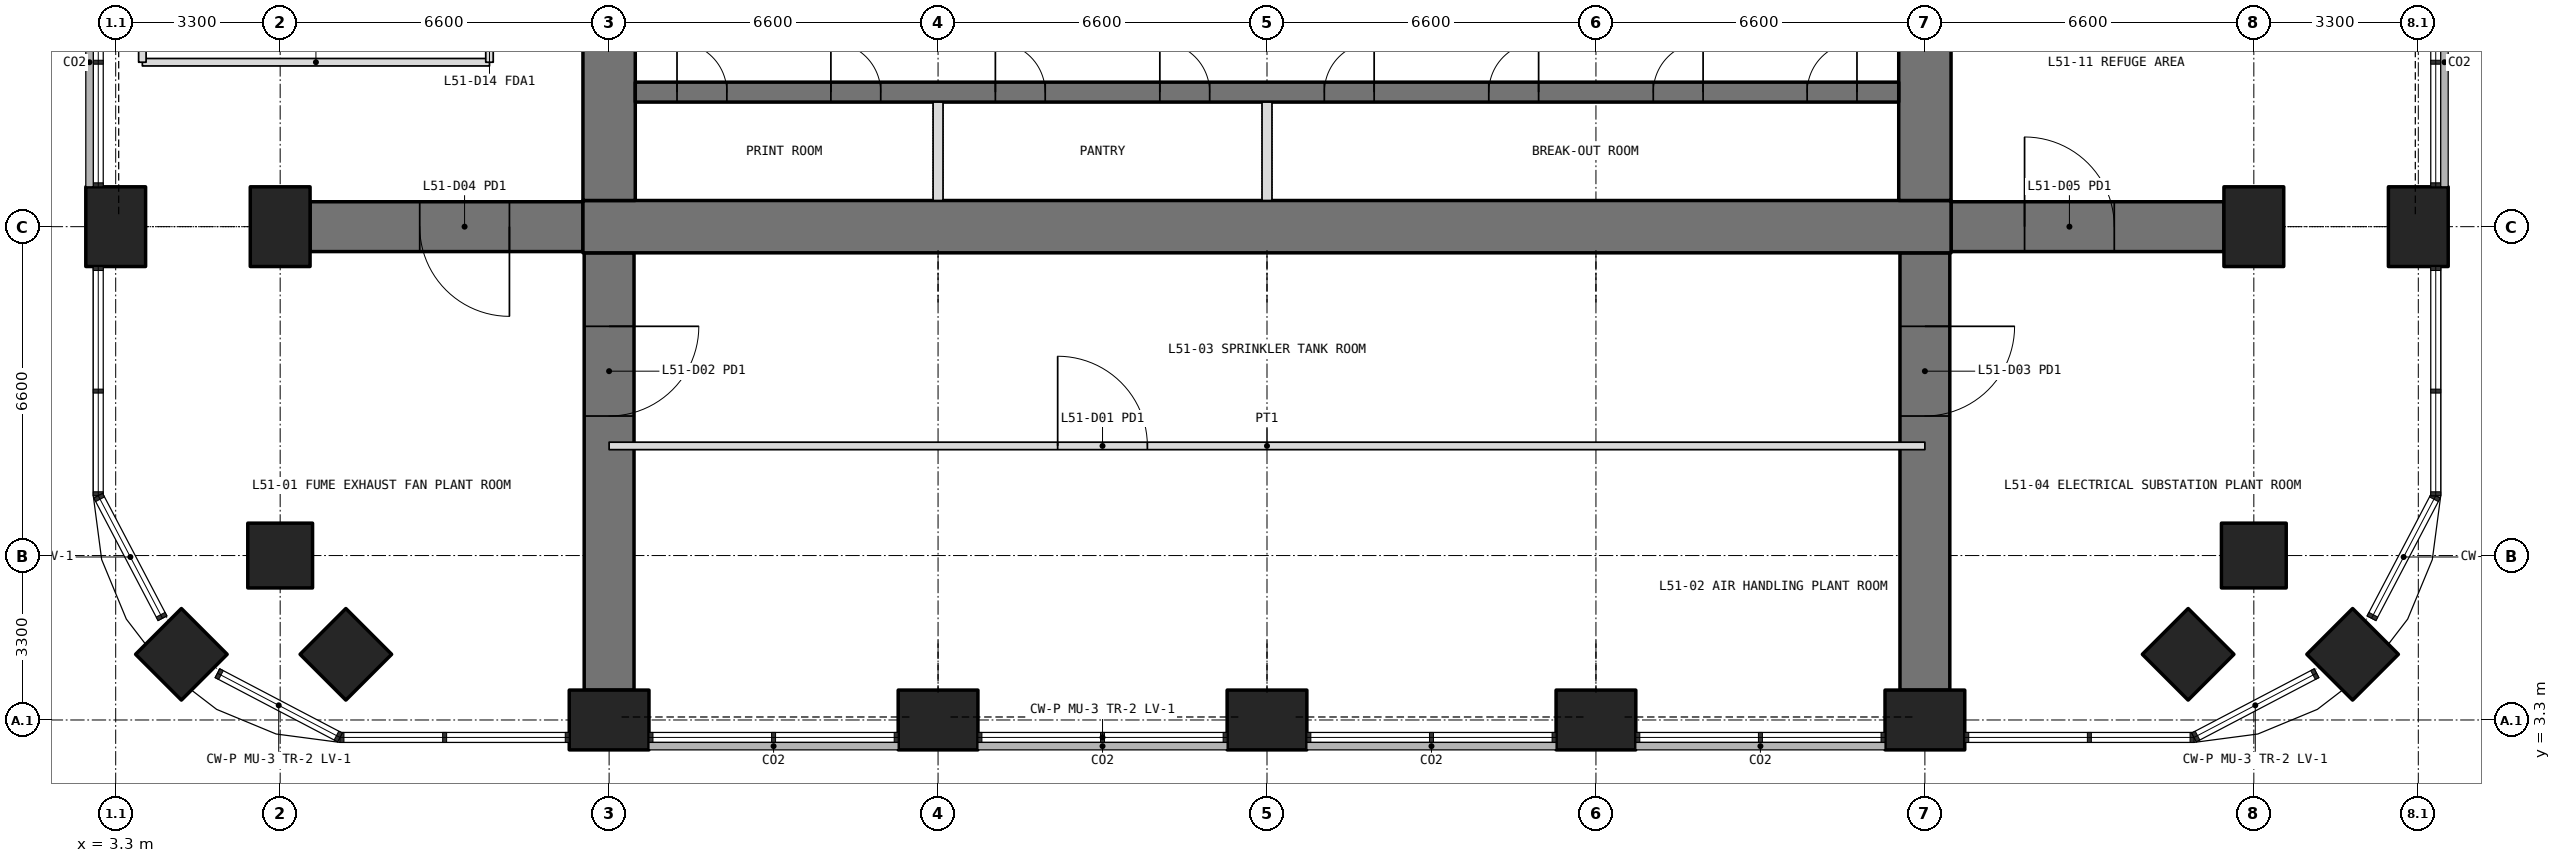
"""IFC4 building model, lengths in metres.
Left out: names, types, materials, properties, quantities, classifications, styles, units other than length and angle.
Written with IfcOpenShell. Run it as: python <this file> out.ifc"""

import sys

from ifc_helpers import new_model, si_unit, direction, frame, frame_2d, origin, origin_2d, place, context, subcontext, project, spatial, rectangle, extrude, element, fill, save


model = new_model("IFC4")
c1 = context("Model", 3, precision=1e-05, world=origin(), true_north=direction((0.0, 1.0)))
c2 = subcontext(c1, "Body", "Model", "MODEL_VIEW")
j1 = project(units=[si_unit("LENGTHUNIT", "METRE"), si_unit("PLANEANGLEUNIT", "RADIAN")], contexts=[c1])
p1 = place(None, origin())
s1 = spatial("IfcSite", under=j1, at=p1, CompositionType="ELEMENT")
p2 = place(p1, origin())
s2 = spatial("IfcBuilding", under=s1, at=p2, CompositionType="ELEMENT")
p3 = place(p2, frame((0.0, 0.0, 222.9)))
s3 = spatial("IfcBuildingStorey", under=s2, at=p3, CompositionType="ELEMENT", Elevation=222.9)
for number, where, z_axis, x_axis in (
    (1, (4.618, 4.618, 0.0), (0.0, 0.0, 1.0), (0.707, 0.707, 0.0)),
    (2, (48.182, 4.618, 0.0), (0.0, 0.0, 1.0), (0.707, 0.707, 0.0)),
):
    element("IfcColumn", number, at=place(p3, frame(where, z_axis=z_axis, x_axis=x_axis)), inside=s3, PredefinedType="COLUMN", context=c2, shape_type="SweptSolid", body=[
        extrude(rectangle(XDim=1.3, YDim=1.3, at=origin_2d()), origin(), (0.0, 0.0, 1.0), 6.3),
    ])
for number, where, z_axis, x_axis in (
    (3, (13.2, 3.3, 0.0), (0.0, 0.0, 1.0), (1.0, 0.0, 0.0)),
    (4, (19.8, 3.3, 0.0), (0.0, 0.0, 1.0), (1.0, 0.0, 0.0)),
    (5, (26.4, 3.3, 0.0), (0.0, 0.0, 1.0), (1.0, 0.0, 0.0)),
    (6, (33.0, 3.3, 0.0), (0.0, 0.0, 1.0), (1.0, 0.0, 0.0)),
    (7, (39.6, 3.3, 0.0), (0.0, 0.0, 1.0), (1.0, 0.0, 0.0)),
    (8, (3.3, 13.2, 0.0), (0.0, 0.0, 1.0), (0.0, 1.0, 0.0)),
    (9, (49.5, 13.2, 0.0), (0.0, 0.0, 1.0), (0.0, 1.0, 0.0)),
):
    element("IfcColumn", number, at=place(p3, frame(where, z_axis=z_axis, x_axis=x_axis)), inside=s3, PredefinedType="COLUMN", context=c2, shape_type="SweptSolid", body=[
        extrude(rectangle(XDim=1.6, YDim=1.2, at=origin_2d()), origin(), (0.0, 0.0, 1.0), 6.3),
    ])
for number, where, z_axis, x_axis in (
    (10, (6.6, 6.6, 0.0), (0.0, 0.0, 1.0), (1.0, 0.0, 0.0)),
    (11, (46.2, 6.6, 0.0), (0.0, 0.0, 1.0), (1.0, 0.0, 0.0)),
    (12, (7.918, 4.618, 0.0), (0.0, 0.0, 1.0), (0.707, 0.707, 0.0)),
    (13, (44.882, 4.618, 0.0), (0.0, 0.0, 1.0), (0.707, 0.707, 0.0)),
):
    element("IfcColumn", number, at=place(p3, frame(where, z_axis=z_axis, x_axis=x_axis)), inside=s3, PredefinedType="COLUMN", context=c2, shape_type="SweptSolid", body=[
        extrude(rectangle(XDim=1.3, YDim=1.3, at=origin_2d()), origin(), (0.0, 0.0, 1.0), 6.3),
    ])
for number, where, z_axis, x_axis in (
    (14, (6.6, 13.2, 0.0), (0.0, 0.0, 1.0), (0.0, 1.0, 0.0)),
    (15, (46.2, 13.2, 0.0), (0.0, 0.0, 1.0), (0.0, 1.0, 0.0)),
):
    element("IfcColumn", number, at=place(p3, frame(where, z_axis=z_axis, x_axis=x_axis)), inside=s3, PredefinedType="COLUMN", context=c2, shape_type="SweptSolid", body=[
        extrude(rectangle(XDim=1.6, YDim=1.2, at=origin_2d()), origin(), (0.0, 0.0, 1.0), 6.3),
    ])
p4 = place(p3, frame((13.2, 12.675, 0.0), z_axis=(0.0, 0.0, 1.0), x_axis=(0.0, -1.0, 0.0)))
e16 = element("IfcWall", 16, at=p4, inside=s3, PredefinedType="SHEAR", context=c2, shape_type="SweptSolid", body=[
    extrude(rectangle(XDim=8.775, YDim=1.0, at=frame_2d((4.388, 0.0))), origin(), (0.0, 0.0, 1.0), 6.0),
])
p5 = place(p4, frame((1.475, 0.0, 0.0)))
e17 = element("IfcOpeningElement", 17, at=p5, cuts=e16, PredefinedType="OPENING", context=c2, shape_type="SweptSolid", body=[
    extrude(rectangle(XDim=1.8, YDim=2.4, at=frame_2d((0.9, 1.2))), frame((0.0, 0.51, 0.0), z_axis=(0.0, -1.0, 0.0), x_axis=(1.0, 0.0, 0.0)), (0.0, 0.0, 1.0), 1.02),
])
p6 = place(p3, frame((39.6, 12.675, 0.0), z_axis=(0.0, 0.0, 1.0), x_axis=(0.0, -1.0, 0.0)))
e18 = element("IfcWall", 18, at=p6, inside=s3, PredefinedType="SHEAR", context=c2, shape_type="SweptSolid", body=[
    extrude(rectangle(XDim=8.775, YDim=1.0, at=frame_2d((4.388, 0.0))), origin(), (0.0, 0.0, 1.0), 6.0),
])
p7 = place(p6, frame((1.475, 0.0, 0.0)))
e19 = element("IfcOpeningElement", 19, at=p7, cuts=e18, PredefinedType="OPENING", context=c2, shape_type="SweptSolid", body=[
    extrude(rectangle(XDim=1.8, YDim=2.4, at=frame_2d((0.9, 1.2))), frame((0.0, 0.51, 0.0), z_axis=(0.0, -1.0, 0.0), x_axis=(1.0, 0.0, 0.0)), (0.0, 0.0, 1.0), 1.02),
])
p8 = place(p3, frame((12.675, 13.2, 0.0), z_axis=(0.0, 0.0, 1.0), x_axis=(-1.0, 0.0, 0.0)))
e20 = element("IfcWall", 20, at=p8, inside=s3, PredefinedType="SHEAR", context=c2, shape_type="SweptSolid", body=[
    extrude(rectangle(XDim=5.475, YDim=1.0, at=frame_2d((2.738, 0.0))), origin(), (0.0, 0.0, 1.0), 6.0),
])
p9 = place(p8, frame((1.475, 0.0, 0.0)))
e21 = element("IfcOpeningElement", 21, at=p9, cuts=e20, PredefinedType="OPENING", context=c2, shape_type="SweptSolid", body=[
    extrude(rectangle(XDim=1.8, YDim=2.4, at=frame_2d((0.9, 1.2))), frame((0.0, 0.51, 0.0), z_axis=(0.0, -1.0, 0.0), x_axis=(1.0, 0.0, 0.0)), (0.0, 0.0, 1.0), 1.02),
])
p10 = place(p3, frame((40.125, 13.2, 0.0), z_axis=(0.0, 0.0, 1.0), x_axis=(1.0, 0.0, 0.0)))
e22 = element("IfcWall", 22, at=p10, inside=s3, PredefinedType="SHEAR", context=c2, shape_type="SweptSolid", body=[
    extrude(rectangle(XDim=5.475, YDim=1.0, at=frame_2d((2.738, 0.0))), origin(), (0.0, 0.0, 1.0), 6.0),
])
p11 = place(p10, frame((1.475, 0.0, 0.0)))
e23 = element("IfcOpeningElement", 23, at=p11, cuts=e22, PredefinedType="OPENING", context=c2, shape_type="SweptSolid", body=[
    extrude(rectangle(XDim=1.8, YDim=2.4, at=frame_2d((0.9, 1.2))), frame((0.0, 0.51, 0.0), z_axis=(0.0, -1.0, 0.0), x_axis=(1.0, 0.0, 0.0)), (0.0, 0.0, 1.0), 1.02),
])
p12 = place(p3, frame((12.675, 13.2, 0.0), z_axis=(0.0, 0.0, 1.0), x_axis=(1.0, 0.0, 0.0)))
e24 = element("IfcWall", 24, at=p12, inside=s3, PredefinedType="SHEAR", context=c2, shape_type="SweptSolid", body=[
    extrude(rectangle(XDim=27.45, YDim=1.05, at=frame_2d((13.725, 0.0))), origin(), (0.0, 0.0, 1.0), 6.3),
])
p13 = place(p3, frame((39.6, 13.725, 0.0), z_axis=(0.0, 0.0, 1.0), x_axis=(0.0, 1.0, 0.0)))
e25 = element("IfcWall", 25, at=p13, inside=s3, PredefinedType="SHEAR", context=c2, shape_type="SweptSolid", body=[
    extrude(rectangle(XDim=18.75, YDim=1.05, at=frame_2d((9.375, 0.0))), origin(), (0.0, 0.0, 1.0), 6.3),
])
p14 = place(p13, frame((3.025, 0.0, 0.0)))
e26 = element("IfcOpeningElement", 26, at=p14, cuts=e25, PredefinedType="OPENING", context=c2, shape_type="SweptSolid", body=[
    extrude(rectangle(XDim=1.6, YDim=2.1, at=frame_2d((0.8, 1.05))), frame((0.0, 0.535, 0.0), z_axis=(0.0, -1.0, 0.0), x_axis=(1.0, 0.0, 0.0)), (0.0, 0.0, 1.0), 1.07),
])
p15 = place(p13, frame((13.825, 0.0, 0.0)))
e27 = element("IfcOpeningElement", 27, at=p15, cuts=e25, PredefinedType="OPENING", context=c2, shape_type="SweptSolid", body=[
    extrude(rectangle(XDim=1.6, YDim=2.1, at=frame_2d((0.8, 1.05))), frame((0.0, 0.535, 0.0), z_axis=(0.0, -1.0, 0.0), x_axis=(1.0, 0.0, 0.0)), (0.0, 0.0, 1.0), 1.07),
])
p16 = place(p3, frame((13.2, 32.475, 0.0), z_axis=(0.0, 0.0, 1.0), x_axis=(0.0, -1.0, 0.0)))
e28 = element("IfcWall", 28, at=p16, inside=s3, PredefinedType="SHEAR", context=c2, shape_type="SweptSolid", body=[
    extrude(rectangle(XDim=18.75, YDim=1.05, at=frame_2d((9.375, 0.0))), origin(), (0.0, 0.0, 1.0), 6.3),
])
p17 = place(p16, frame((14.125, 0.0, 0.0)))
e29 = element("IfcOpeningElement", 29, at=p17, cuts=e28, PredefinedType="OPENING", context=c2, shape_type="SweptSolid", body=[
    extrude(rectangle(XDim=1.6, YDim=2.1, at=frame_2d((0.8, 1.05))), frame((0.0, 0.535, 0.0), z_axis=(0.0, -1.0, 0.0), x_axis=(1.0, 0.0, 0.0)), (0.0, 0.0, 1.0), 1.07),
])
p18 = place(p16, frame((3.325, 0.0, 0.0)))
e30 = element("IfcOpeningElement", 30, at=p18, cuts=e28, PredefinedType="OPENING", context=c2, shape_type="SweptSolid", body=[
    extrude(rectangle(XDim=1.6, YDim=2.1, at=frame_2d((0.8, 1.05))), frame((0.0, 0.535, 0.0), z_axis=(0.0, -1.0, 0.0), x_axis=(1.0, 0.0, 0.0)), (0.0, 0.0, 1.0), 1.07),
])
p19 = place(p3, frame((13.725, 15.9, 0.0), z_axis=(0.0, 0.0, 1.0), x_axis=(1.0, 0.0, 0.0)))
e31 = element("IfcWall", 31, at=p19, inside=s3, PredefinedType="SHEAR", context=c2, shape_type="SweptSolid", body=[
    extrude(rectangle(XDim=25.35, YDim=0.4, at=frame_2d((12.675, 0.0))), origin(), (0.0, 0.0, 1.0), 6.3),
])
p20 = place(p19, frame((0.837, 0.0, 0.0)))
e32 = element("IfcOpeningElement", 32, at=p20, cuts=e31, PredefinedType="OPENING", context=c2, shape_type="SweptSolid", body=[
    extrude(rectangle(XDim=1.0, YDim=2.1, at=frame_2d((0.5, 1.05))), frame((0.0, 0.21, 0.0), z_axis=(0.0, -1.0, 0.0), x_axis=(1.0, 0.0, 0.0)), (0.0, 0.0, 1.0), 0.42),
])
p21 = place(p19, frame((3.925, 0.0, 0.0)))
e33 = element("IfcOpeningElement", 33, at=p21, cuts=e31, PredefinedType="OPENING", context=c2, shape_type="SweptSolid", body=[
    extrude(rectangle(XDim=1.0, YDim=2.1, at=frame_2d((0.5, 1.05))), frame((0.0, 0.21, 0.0), z_axis=(0.0, -1.0, 0.0), x_axis=(1.0, 0.0, 0.0)), (0.0, 0.0, 1.0), 0.42),
])
p22 = place(p19, frame((7.225, 0.0, 0.0)))
e34 = element("IfcOpeningElement", 34, at=p22, cuts=e31, PredefinedType="OPENING", context=c2, shape_type="SweptSolid", body=[
    extrude(rectangle(XDim=1.0, YDim=2.1, at=frame_2d((0.5, 1.05))), frame((0.0, 0.21, 0.0), z_axis=(0.0, -1.0, 0.0), x_axis=(1.0, 0.0, 0.0)), (0.0, 0.0, 1.0), 0.42),
])
p23 = place(p19, frame((10.525, 0.0, 0.0)))
e35 = element("IfcOpeningElement", 35, at=p23, cuts=e31, PredefinedType="OPENING", context=c2, shape_type="SweptSolid", body=[
    extrude(rectangle(XDim=1.0, YDim=2.1, at=frame_2d((0.5, 1.05))), frame((0.0, 0.21, 0.0), z_axis=(0.0, -1.0, 0.0), x_axis=(1.0, 0.0, 0.0)), (0.0, 0.0, 1.0), 0.42),
])
p24 = place(p19, frame((13.825, 0.0, 0.0)))
e36 = element("IfcOpeningElement", 36, at=p24, cuts=e31, PredefinedType="OPENING", context=c2, shape_type="SweptSolid", body=[
    extrude(rectangle(XDim=1.0, YDim=2.1, at=frame_2d((0.5, 1.05))), frame((0.0, 0.21, 0.0), z_axis=(0.0, -1.0, 0.0), x_axis=(1.0, 0.0, 0.0)), (0.0, 0.0, 1.0), 0.42),
])
p25 = place(p19, frame((17.125, 0.0, 0.0)))
e37 = element("IfcOpeningElement", 37, at=p25, cuts=e31, PredefinedType="OPENING", context=c2, shape_type="SweptSolid", body=[
    extrude(rectangle(XDim=1.0, YDim=2.1, at=frame_2d((0.5, 1.05))), frame((0.0, 0.21, 0.0), z_axis=(0.0, -1.0, 0.0), x_axis=(1.0, 0.0, 0.0)), (0.0, 0.0, 1.0), 0.42),
])
p26 = place(p19, frame((20.425, 0.0, 0.0)))
e38 = element("IfcOpeningElement", 38, at=p26, cuts=e31, PredefinedType="OPENING", context=c2, shape_type="SweptSolid", body=[
    extrude(rectangle(XDim=1.0, YDim=2.1, at=frame_2d((0.5, 1.05))), frame((0.0, 0.21, 0.0), z_axis=(0.0, -1.0, 0.0), x_axis=(1.0, 0.0, 0.0)), (0.0, 0.0, 1.0), 0.42),
])
p27 = place(p19, frame((23.512, 0.0, 0.0)))
e39 = element("IfcOpeningElement", 39, at=p27, cuts=e31, PredefinedType="OPENING", context=c2, shape_type="SweptSolid", body=[
    extrude(rectangle(XDim=1.0, YDim=2.1, at=frame_2d((0.5, 1.05))), frame((0.0, 0.21, 0.0), z_axis=(0.0, -1.0, 0.0), x_axis=(1.0, 0.0, 0.0)), (0.0, 0.0, 1.0), 0.42),
])
for number, where, z_axis, x_axis in (
    (40, (19.8, 13.725, 0.0), (0.0, 0.0, 1.0), (0.0, 1.0, 0.0)),
    (41, (26.4, 13.725, 0.0), (0.0, 0.0, 1.0), (0.0, 1.0, 0.0)),
):
    element("IfcWall", number, at=place(p3, frame(where, z_axis=z_axis, x_axis=x_axis)), inside=s3, PredefinedType="PARTITIONING", context=c2, shape_type="SweptSolid", body=[
        extrude(rectangle(XDim=1.975, YDim=0.2, at=frame_2d((0.987, 0.0))), origin(), (0.0, 0.0, 1.0), 6.3),
    ])
p28 = place(p3, frame((13.2, 8.8, 0.0), z_axis=(0.0, 0.0, 1.0), x_axis=(1.0, 0.0, 0.0)))
e42 = element("IfcWall", 42, at=p28, inside=s3, PredefinedType="PARTITIONING", context=c2, shape_type="SweptSolid", body=[
    extrude(rectangle(XDim=26.4, YDim=0.15, at=frame_2d((13.2, 0.0))), origin(), (0.0, 0.0, 1.0), 4.0),
])
p29 = place(p28, frame((9.0, 0.0, 0.0)))
e43 = element("IfcOpeningElement", 43, at=p29, cuts=e42, PredefinedType="OPENING", context=c2, shape_type="SweptSolid", body=[
    extrude(rectangle(XDim=1.8, YDim=2.4, at=frame_2d((0.9, 1.2))), frame((0.0, 0.085, 0.0), z_axis=(0.0, -1.0, 0.0), x_axis=(1.0, 0.0, 0.0)), (0.0, 0.0, 1.0), 0.17),
])
p30 = place(p3, frame((10.8, 16.5, 0.0), z_axis=(0.0, 0.0, 1.0), x_axis=(-1.0, 0.0, 0.0)))
e44 = element("IfcWall", 44, at=p30, inside=s3, PredefinedType="PARTITIONING", context=c2, shape_type="SweptSolid", body=[
    extrude(rectangle(XDim=6.965, YDim=0.15, at=frame_2d((3.482, 0.0))), origin(), (0.0, 0.0, 1.0), 4.0),
])
p31 = place(p3, frame((3.835, 16.5, 0.0), z_axis=(0.0, 0.0, 1.0), x_axis=(0.0, 1.0, 0.0)))
e45 = element("IfcWall", 45, at=p31, inside=s3, PredefinedType="PARTITIONING", context=c2, shape_type="SweptSolid", body=[
    extrude(rectangle(XDim=2.5, YDim=0.15, at=frame_2d((1.25, 0.0))), origin(), (0.0, 0.0, 1.0), 4.0),
])
p32 = place(p3, frame((10.8, 26.4, 0.0), z_axis=(0.0, 0.0, 1.0), x_axis=(0.0, -1.0, 0.0)))
e46 = element("IfcWall", 46, at=p32, inside=s3, PredefinedType="PARTITIONING", context=c2, shape_type="SweptSolid", body=[
    extrude(rectangle(XDim=9.9, YDim=0.15, at=frame_2d((4.95, 0.0))), origin(), (0.0, 0.0, 1.0), 4.0),
])
p33 = place(p32, frame((8.35, 0.0, 0.0)))
e47 = element("IfcOpeningElement", 47, at=p33, cuts=e46, PredefinedType="OPENING", context=c2, shape_type="SweptSolid", body=[
    extrude(rectangle(XDim=1.0, YDim=2.1, at=frame_2d((0.5, 1.05))), frame((0.0, 0.085, 0.0), z_axis=(0.0, -1.0, 0.0), x_axis=(1.0, 0.0, 0.0)), (0.0, 0.0, 1.0), 0.17),
])
p34 = place(p32, frame((5.35, 0.0, 0.0)))
e48 = element("IfcOpeningElement", 48, at=p34, cuts=e46, PredefinedType="OPENING", context=c2, shape_type="SweptSolid", body=[
    extrude(rectangle(XDim=0.9, YDim=2.1, at=frame_2d((0.45, 1.05))), frame((0.0, 0.085, 0.0), z_axis=(0.0, -1.0, 0.0), x_axis=(1.0, 0.0, 0.0)), (0.0, 0.0, 1.0), 0.17),
])
p35 = place(p32, frame((1.45, 0.0, 0.0)))
e49 = element("IfcOpeningElement", 49, at=p35, cuts=e46, PredefinedType="OPENING", context=c2, shape_type="SweptSolid", body=[
    extrude(rectangle(XDim=0.9, YDim=2.1, at=frame_2d((0.45, 1.05))), frame((0.0, 0.085, 0.0), z_axis=(0.0, -1.0, 0.0), x_axis=(1.0, 0.0, 0.0)), (0.0, 0.0, 1.0), 0.17),
])
p36 = place(p29, origin())
e50 = element("IfcDoor", 50, at=p36, inside=s3, OperationType="DOUBLE_DOOR_SINGLE_SWING", PredefinedType="DOOR", context=c2, shape_type="SweptSolid", body=[
    extrude(rectangle(XDim=1.8, YDim=2.4, at=frame_2d((0.9, 1.2))), frame((0.0, 0.025, 0.0), z_axis=(0.0, -1.0, 0.0), x_axis=(1.0, 0.0, 0.0)), (0.0, 0.0, 1.0), 0.05),
])
fill(e43, e50)
p37 = place(p5, origin())
e51 = element("IfcDoor", 51, at=p37, inside=s3, OperationType="DOUBLE_DOOR_SINGLE_SWING", PredefinedType="DOOR", context=c2, shape_type="SweptSolid", body=[
    extrude(rectangle(XDim=1.8, YDim=2.4, at=frame_2d((0.9, 1.2))), frame((0.0, 0.025, 0.0), z_axis=(0.0, -1.0, 0.0), x_axis=(1.0, 0.0, 0.0)), (0.0, 0.0, 1.0), 0.05),
])
fill(e17, e51)
p38 = place(p7, origin())
e52 = element("IfcDoor", 52, at=p38, inside=s3, OperationType="DOUBLE_DOOR_SINGLE_SWING", PredefinedType="DOOR", context=c2, shape_type="SweptSolid", body=[
    extrude(rectangle(XDim=1.8, YDim=2.4, at=frame_2d((0.9, 1.2))), frame((0.0, 0.025, 0.0), z_axis=(0.0, -1.0, 0.0), x_axis=(1.0, 0.0, 0.0)), (0.0, 0.0, 1.0), 0.05),
])
fill(e19, e52)
p39 = place(p9, origin())
e53 = element("IfcDoor", 53, at=p39, inside=s3, OperationType="DOUBLE_DOOR_SINGLE_SWING", PredefinedType="DOOR", context=c2, shape_type="SweptSolid", body=[
    extrude(rectangle(XDim=1.8, YDim=2.4, at=frame_2d((0.9, 1.2))), frame((0.0, 0.025, 0.0), z_axis=(0.0, -1.0, 0.0), x_axis=(1.0, 0.0, 0.0)), (0.0, 0.0, 1.0), 0.05),
])
fill(e21, e53)
p40 = place(p11, origin())
e54 = element("IfcDoor", 54, at=p40, inside=s3, OperationType="DOUBLE_DOOR_SINGLE_SWING", PredefinedType="DOOR", context=c2, shape_type="SweptSolid", body=[
    extrude(rectangle(XDim=1.8, YDim=2.4, at=frame_2d((0.9, 1.2))), frame((0.0, 0.025, 0.0), z_axis=(0.0, -1.0, 0.0), x_axis=(1.0, 0.0, 0.0)), (0.0, 0.0, 1.0), 0.05),
])
fill(e23, e54)
p41 = place(p20, origin())
e55 = element("IfcDoor", 55, at=p41, inside=s3, OperationType="SINGLE_SWING_LEFT", PredefinedType="DOOR", context=c2, shape_type="SweptSolid", body=[
    extrude(rectangle(XDim=1.0, YDim=2.1, at=frame_2d((0.5, 1.05))), frame((0.0, 0.025, 0.0), z_axis=(0.0, -1.0, 0.0), x_axis=(1.0, 0.0, 0.0)), (0.0, 0.0, 1.0), 0.05),
])
fill(e32, e55)
p42 = place(p21, origin())
e56 = element("IfcDoor", 56, at=p42, inside=s3, OperationType="SINGLE_SWING_LEFT", PredefinedType="DOOR", context=c2, shape_type="SweptSolid", body=[
    extrude(rectangle(XDim=1.0, YDim=2.1, at=frame_2d((0.5, 1.05))), frame((0.0, 0.025, 0.0), z_axis=(0.0, -1.0, 0.0), x_axis=(1.0, 0.0, 0.0)), (0.0, 0.0, 1.0), 0.05),
])
fill(e33, e56)
p43 = place(p22, origin())
e57 = element("IfcDoor", 57, at=p43, inside=s3, OperationType="SINGLE_SWING_LEFT", PredefinedType="DOOR", context=c2, shape_type="SweptSolid", body=[
    extrude(rectangle(XDim=1.0, YDim=2.1, at=frame_2d((0.5, 1.05))), frame((0.0, 0.025, 0.0), z_axis=(0.0, -1.0, 0.0), x_axis=(1.0, 0.0, 0.0)), (0.0, 0.0, 1.0), 0.05),
])
fill(e34, e57)
p44 = place(p23, origin())
e58 = element("IfcDoor", 58, at=p44, inside=s3, OperationType="SINGLE_SWING_LEFT", PredefinedType="DOOR", context=c2, shape_type="SweptSolid", body=[
    extrude(rectangle(XDim=1.0, YDim=2.1, at=frame_2d((0.5, 1.05))), frame((0.0, 0.025, 0.0), z_axis=(0.0, -1.0, 0.0), x_axis=(1.0, 0.0, 0.0)), (0.0, 0.0, 1.0), 0.05),
])
fill(e35, e58)
p45 = place(p24, origin())
e59 = element("IfcDoor", 59, at=p45, inside=s3, OperationType="SINGLE_SWING_RIGHT", PredefinedType="DOOR", context=c2, shape_type="SweptSolid", body=[
    extrude(rectangle(XDim=1.0, YDim=2.1, at=frame_2d((0.5, 1.05))), frame((0.0, 0.025, 0.0), z_axis=(0.0, -1.0, 0.0), x_axis=(1.0, 0.0, 0.0)), (0.0, 0.0, 1.0), 0.05),
])
fill(e36, e59)
p46 = place(p25, origin())
e60 = element("IfcDoor", 60, at=p46, inside=s3, OperationType="SINGLE_SWING_RIGHT", PredefinedType="DOOR", context=c2, shape_type="SweptSolid", body=[
    extrude(rectangle(XDim=1.0, YDim=2.1, at=frame_2d((0.5, 1.05))), frame((0.0, 0.025, 0.0), z_axis=(0.0, -1.0, 0.0), x_axis=(1.0, 0.0, 0.0)), (0.0, 0.0, 1.0), 0.05),
])
fill(e37, e60)
p47 = place(p26, origin())
e61 = element("IfcDoor", 61, at=p47, inside=s3, OperationType="SINGLE_SWING_RIGHT", PredefinedType="DOOR", context=c2, shape_type="SweptSolid", body=[
    extrude(rectangle(XDim=1.0, YDim=2.1, at=frame_2d((0.5, 1.05))), frame((0.0, 0.025, 0.0), z_axis=(0.0, -1.0, 0.0), x_axis=(1.0, 0.0, 0.0)), (0.0, 0.0, 1.0), 0.05),
])
fill(e38, e61)
p48 = place(p27, origin())
e62 = element("IfcDoor", 62, at=p48, inside=s3, OperationType="SINGLE_SWING_RIGHT", PredefinedType="DOOR", context=c2, shape_type="SweptSolid", body=[
    extrude(rectangle(XDim=1.0, YDim=2.1, at=frame_2d((0.5, 1.05))), frame((0.0, 0.025, 0.0), z_axis=(0.0, -1.0, 0.0), x_axis=(1.0, 0.0, 0.0)), (0.0, 0.0, 1.0), 0.05),
])
fill(e39, e62)
save(model, sys.argv[1])
